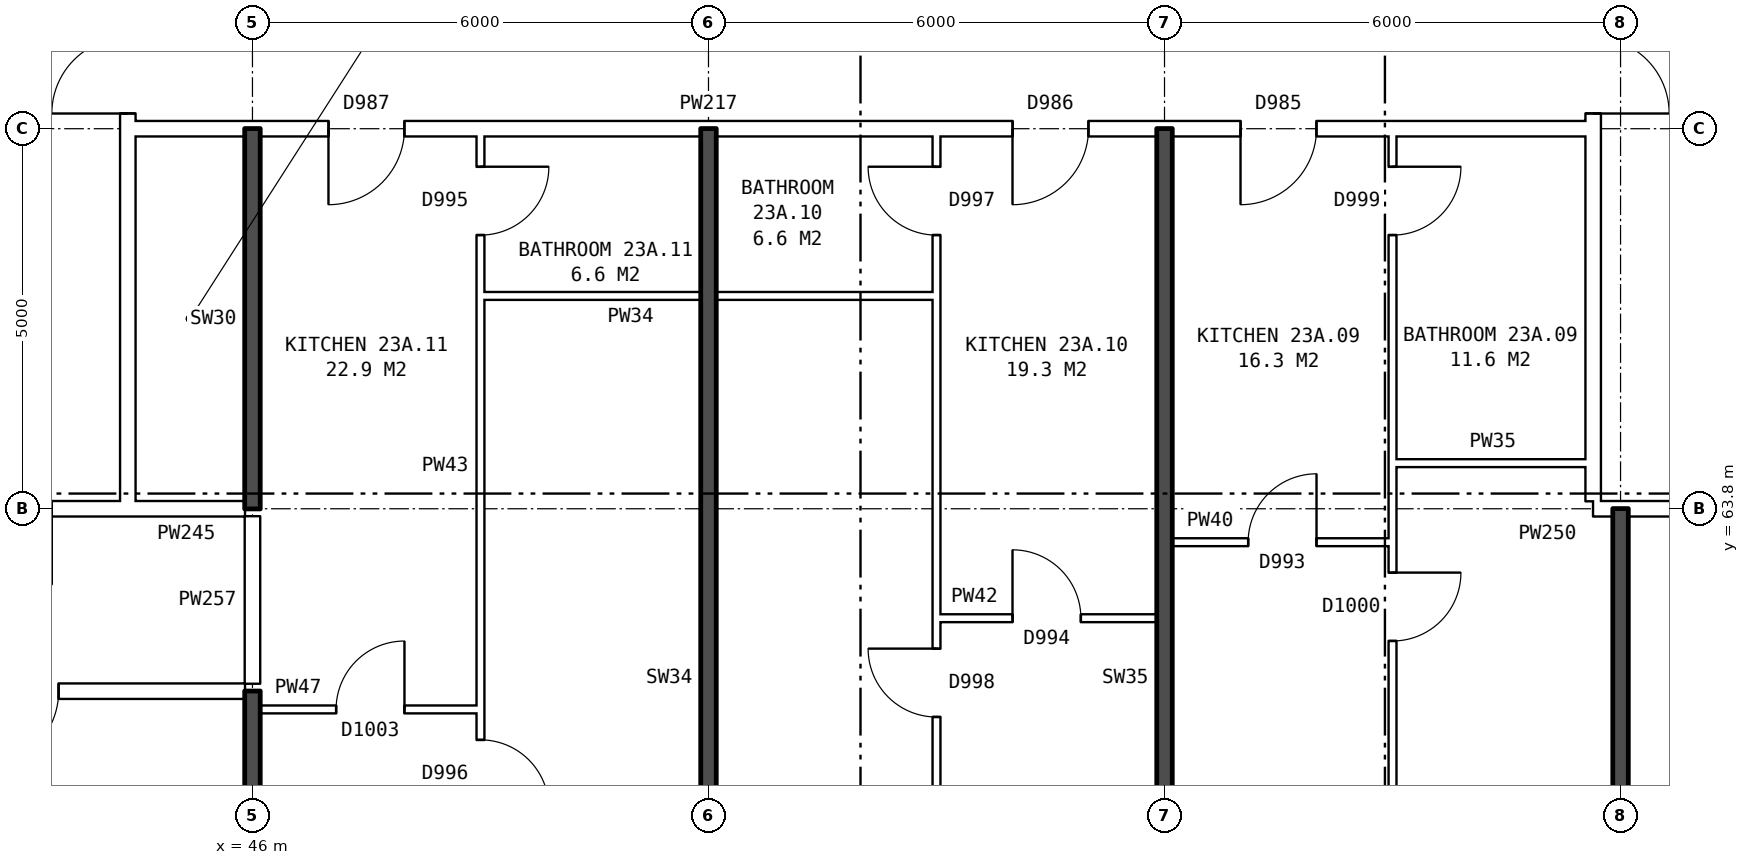
"""IFC4 building model, lengths in metres.
Left out: names, types, materials, properties, quantities, classifications, styles, units other than length and angle.
Written with IfcOpenShell. Run it as: python <this file> out.ifc"""

import sys

from ifc_helpers import new_model, si_unit, direction, frame, frame_2d, origin, place, context, subcontext, project, spatial, rectangle, extrude, element, fill, save


model = new_model("IFC4")
c1 = context("Model", 3, precision=1e-05, world=origin(), true_north=direction((0.0, 1.0)))
c2 = subcontext(c1, "Body", "Model", "MODEL_VIEW")
j1 = project(units=[si_unit("LENGTHUNIT", "METRE"), si_unit("PLANEANGLEUNIT", "RADIAN")], contexts=[c1])
p1 = place(None, origin())
s1 = spatial("IfcSite", under=j1, at=p1, CompositionType="ELEMENT")
p2 = place(p1, origin())
s2 = spatial("IfcBuilding", under=s1, at=p2, CompositionType="ELEMENT")
p3 = place(p2, frame((0.0, 0.0, 84.0)))
s3 = spatial("IfcBuildingStorey", under=s2, at=p3, CompositionType="ELEMENT", Elevation=84.0)
p4 = place(p3, frame((63.64, 63.9, 0.0), z_axis=(0.0, 0.0, 1.0), x_axis=(0.0, 1.0, 0.0)))
e1 = element("IfcWall", 1, at=p4, inside=s3, PredefinedType="PARTITIONING", context=c2, shape_type="SweptSolid", body=[
    extrude(rectangle(XDim=12.2, YDim=0.2, at=frame_2d((6.1, 0.0))), origin(), (0.0, 0.0, 1.0), 2.85),
])
p5 = place(p4, frame((5.1, 0.0, 0.0)))
e2 = element("IfcOpeningElement", 2, at=p5, cuts=e1, PredefinedType="OPENING", context=c2, shape_type="SweptSolid", body=[
    extrude(rectangle(XDim=2.0, YDim=2.1, at=frame_2d((1.0, 1.05))), frame((0.0, 0.11, 0.0), z_axis=(0.0, -1.0, 0.0), x_axis=(1.0, 0.0, 0.0)), (0.0, 0.0, 1.0), 0.22),
])
p6 = place(p3, frame((44.36, 63.9, 0.0), z_axis=(0.0, 0.0, 1.0), x_axis=(0.0, 1.0, 0.0)))
e3 = element("IfcWall", 3, at=p6, inside=s3, PredefinedType="PARTITIONING", context=c2, shape_type="SweptSolid", body=[
    extrude(rectangle(XDim=12.2, YDim=0.2, at=frame_2d((6.1, 0.0))), origin(), (0.0, 0.0, 1.0), 2.85),
])
p7 = place(p6, frame((5.1, 0.0, 0.0)))
e4 = element("IfcOpeningElement", 4, at=p7, cuts=e3, PredefinedType="OPENING", context=c2, shape_type="SweptSolid", body=[
    extrude(rectangle(XDim=2.0, YDim=2.1, at=frame_2d((1.0, 1.05))), frame((0.0, 0.11, 0.0), z_axis=(0.0, -1.0, 0.0), x_axis=(1.0, 0.0, 0.0)), (0.0, 0.0, 1.0), 0.22),
])
p8 = place(p3, frame((46.1, 61.16, 0.0), z_axis=(0.0, 0.0, 1.0), x_axis=(1.0, 0.0, 0.0)))
e5 = element("IfcWall", 5, at=p8, inside=s3, PredefinedType="PARTITIONING", context=c2, shape_type="SweptSolid", body=[
    extrude(rectangle(XDim=2.9, YDim=0.1, at=frame_2d((1.45, 0.0))), origin(), (0.0, 0.0, 1.0), 2.85),
])
p9 = place(p8, frame((1.0, 0.0, 0.0)))
e6 = element("IfcOpeningElement", 6, at=p9, cuts=e5, PredefinedType="OPENING", context=c2, shape_type="SweptSolid", body=[
    extrude(rectangle(XDim=0.9, YDim=2.1, at=frame_2d((0.45, 1.05))), frame((0.0, 0.06, 0.0), z_axis=(0.0, -1.0, 0.0), x_axis=(1.0, 0.0, 0.0)), (0.0, 0.0, 1.0), 0.12),
])
p10 = place(p3, frame((23.61, 61.4, 0.0), z_axis=(0.0, 0.0, 1.0), x_axis=(1.0, 0.0, 0.0)))
e7 = element("IfcWall", 7, at=p10, inside=s3, PredefinedType="PARTITIONING", context=c2, shape_type="SweptSolid", body=[
    extrude(rectangle(XDim=22.29, YDim=0.2, at=frame_2d((11.145, 0.0))), origin(), (0.0, 0.0, 1.0), 2.85),
])
p11 = place(p10, frame((18.84, 0.0, 0.0)))
e8 = element("IfcOpeningElement", 8, at=p11, cuts=e7, PredefinedType="OPENING", context=c2, shape_type="SweptSolid", body=[
    extrude(rectangle(XDim=1.0, YDim=2.1, at=frame_2d((0.5, 1.05))), frame((0.0, 0.11, 0.0), z_axis=(0.0, -1.0, 0.0), x_axis=(1.0, 0.0, 0.0)), (0.0, 0.0, 1.0), 0.22),
])
p12 = place(p10, frame((6.89, 0.0, 0.0)))
e9 = element("IfcOpeningElement", 9, at=p12, cuts=e7, PredefinedType="OPENING", context=c2, shape_type="SweptSolid", body=[
    extrude(rectangle(XDim=1.0, YDim=2.1, at=frame_2d((0.5, 1.05))), frame((0.0, 0.11, 0.0), z_axis=(0.0, -1.0, 0.0), x_axis=(1.0, 0.0, 0.0)), (0.0, 0.0, 1.0), 0.22),
])
p13 = place(p3, frame((55.0, 62.36, 0.0), z_axis=(0.0, 0.0, 1.0), x_axis=(1.0, 0.0, 0.0)))
e10 = element("IfcWall", 10, at=p13, inside=s3, PredefinedType="PARTITIONING", context=c2, shape_type="SweptSolid", body=[
    extrude(rectangle(XDim=2.9, YDim=0.1, at=frame_2d((1.45, 0.0))), origin(), (0.0, 0.0, 1.0), 2.85),
])
p14 = place(p13, frame((1.0, 0.0, 0.0)))
e11 = element("IfcOpeningElement", 11, at=p14, cuts=e10, PredefinedType="OPENING", context=c2, shape_type="SweptSolid", body=[
    extrude(rectangle(XDim=0.9, YDim=2.1, at=frame_2d((0.45, 1.05))), frame((0.0, 0.06, 0.0), z_axis=(0.0, -1.0, 0.0), x_axis=(1.0, 0.0, 0.0)), (0.0, 0.0, 1.0), 0.12),
])
p15 = place(p3, frame((58.1, 63.36, 0.0), z_axis=(0.0, 0.0, 1.0), x_axis=(1.0, 0.0, 0.0)))
e12 = element("IfcWall", 12, at=p15, inside=s3, PredefinedType="PARTITIONING", context=c2, shape_type="SweptSolid", body=[
    extrude(rectangle(XDim=2.9, YDim=0.1, at=frame_2d((1.45, 0.0))), origin(), (0.0, 0.0, 1.0), 2.85),
])
p16 = place(p15, frame((1.0, 0.0, 0.0)))
e13 = element("IfcOpeningElement", 13, at=p16, cuts=e12, PredefinedType="OPENING", context=c2, shape_type="SweptSolid", body=[
    extrude(rectangle(XDim=0.9, YDim=2.1, at=frame_2d((0.45, 1.05))), frame((0.0, 0.06, 0.0), z_axis=(0.0, -1.0, 0.0), x_axis=(1.0, 0.0, 0.0)), (0.0, 0.0, 1.0), 0.12),
])
p17 = place(p3, frame((41.36, 63.8, 0.0), z_axis=(0.0, 0.0, 1.0), x_axis=(1.0, 0.0, 0.0)))
e14 = element("IfcWall", 14, at=p17, inside=s3, PredefinedType="PARTITIONING", context=c2, shape_type="SweptSolid", body=[
    extrude(rectangle(XDim=3.0, YDim=0.2, at=frame_2d((1.5, 0.0))), origin(), (0.0, 0.0, 1.0), 2.85),
])
p18 = place(p17, frame((1.0, 0.0, 0.0)))
e15 = element("IfcOpeningElement", 15, at=p18, cuts=e14, PredefinedType="OPENING", context=c2, shape_type="SweptSolid", body=[
    extrude(rectangle(XDim=1.0, YDim=2.1, at=frame_2d((0.5, 1.05))), frame((0.0, 0.11, 0.0), z_axis=(0.0, -1.0, 0.0), x_axis=(1.0, 0.0, 0.0)), (0.0, 0.0, 1.0), 0.22),
])
p19 = place(p3, frame((44.36, 63.8, 0.0), z_axis=(0.0, 0.0, 1.0), x_axis=(1.0, 0.0, 0.0)))
e16 = element("IfcWall", 16, at=p19, inside=s3, PredefinedType="PARTITIONING", context=c2, shape_type="SweptSolid", body=[
    extrude(rectangle(XDim=1.54, YDim=0.2, at=frame_2d((0.77, 0.0))), origin(), (0.0, 0.0, 1.0), 2.85),
])
p20 = place(p3, frame((63.64, 63.8, 0.0), z_axis=(0.0, 0.0, 1.0), x_axis=(1.0, 0.0, 0.0)))
e17 = element("IfcWall", 17, at=p20, inside=s3, PredefinedType="PARTITIONING", context=c2, shape_type="SweptSolid", body=[
    extrude(rectangle(XDim=3.0, YDim=0.2, at=frame_2d((1.5, 0.0))), origin(), (0.0, 0.0, 1.0), 2.85),
])
p21 = place(p20, frame((1.18, 0.0, 0.0)))
e18 = element("IfcOpeningElement", 18, at=p21, cuts=e17, PredefinedType="OPENING", context=c2, shape_type="SweptSolid", body=[
    extrude(rectangle(XDim=1.0, YDim=2.1, at=frame_2d((0.5, 1.05))), frame((0.0, 0.11, 0.0), z_axis=(0.0, -1.0, 0.0), x_axis=(1.0, 0.0, 0.0)), (0.0, 0.0, 1.0), 0.22),
])
p22 = place(p3, frame((61.0, 64.4, 0.0), z_axis=(0.0, 0.0, 1.0), x_axis=(1.0, 0.0, 0.0)))
e19 = element("IfcWall", 19, at=p22, inside=s3, PredefinedType="PARTITIONING", context=c2, shape_type="SweptSolid", body=[
    extrude(rectangle(XDim=2.64, YDim=0.1, at=frame_2d((1.32, 0.0))), origin(), (0.0, 0.0, 1.0), 2.85),
])
p23 = place(p3, frame((49.0, 66.6, 0.0), z_axis=(0.0, 0.0, 1.0), x_axis=(1.0, 0.0, 0.0)))
e20 = element("IfcWall", 20, at=p23, inside=s3, PredefinedType="PARTITIONING", context=c2, shape_type="SweptSolid", body=[
    extrude(rectangle(XDim=6.0, YDim=0.1, at=frame_2d((3.0, 0.0))), origin(), (0.0, 0.0, 1.0), 2.85),
])
p24 = place(p3, frame((44.36, 68.8, 0.0), z_axis=(0.0, 0.0, 1.0), x_axis=(1.0, 0.0, 0.0)))
e21 = element("IfcWall", 21, at=p24, inside=s3, PredefinedType="PARTITIONING", context=c2, shape_type="SweptSolid", body=[
    extrude(rectangle(XDim=19.28, YDim=0.2, at=frame_2d((9.64, 0.0))), origin(), (0.0, 0.0, 1.0), 2.85),
])
p25 = place(p24, frame((14.64, 0.0, 0.0)))
e22 = element("IfcOpeningElement", 22, at=p25, cuts=e21, PredefinedType="OPENING", context=c2, shape_type="SweptSolid", body=[
    extrude(rectangle(XDim=1.0, YDim=2.1, at=frame_2d((0.5, 1.05))), frame((0.0, 0.11, 0.0), z_axis=(0.0, -1.0, 0.0), x_axis=(1.0, 0.0, 0.0)), (0.0, 0.0, 1.0), 0.22),
])
p26 = place(p24, frame((11.64, 0.0, 0.0)))
e23 = element("IfcOpeningElement", 23, at=p26, cuts=e21, PredefinedType="OPENING", context=c2, shape_type="SweptSolid", body=[
    extrude(rectangle(XDim=1.0, YDim=2.1, at=frame_2d((0.5, 1.05))), frame((0.0, 0.11, 0.0), z_axis=(0.0, -1.0, 0.0), x_axis=(1.0, 0.0, 0.0)), (0.0, 0.0, 1.0), 0.22),
])
p27 = place(p24, frame((2.64, 0.0, 0.0)))
e24 = element("IfcOpeningElement", 24, at=p27, cuts=e21, PredefinedType="OPENING", context=c2, shape_type="SweptSolid", body=[
    extrude(rectangle(XDim=1.0, YDim=2.1, at=frame_2d((0.5, 1.05))), frame((0.0, 0.11, 0.0), z_axis=(0.0, -1.0, 0.0), x_axis=(1.0, 0.0, 0.0)), (0.0, 0.0, 1.0), 0.22),
])
p28 = place(p3, frame((46.0, 54.36, 0.0), z_axis=(0.0, 0.0, 1.0), x_axis=(0.0, 1.0, 0.0)))
e25 = element("IfcWall", 25, at=p28, inside=s3, PredefinedType="SOLIDWALL", context=c2, shape_type="SweptSolid", body=[
    extrude(rectangle(XDim=7.04, YDim=0.2, at=frame_2d((3.52, 0.0))), origin(), (0.0, 0.0, 1.0), 2.85),
])
p29 = place(p3, frame((46.0, 61.5, 0.0), z_axis=(0.0, 0.0, 1.0), x_axis=(0.0, 1.0, 0.0)))
e26 = element("IfcWall", 26, at=p29, inside=s3, PredefinedType="PARTITIONING", context=c2, shape_type="SweptSolid", body=[
    extrude(rectangle(XDim=2.2, YDim=0.2, at=frame_2d((1.1, 0.0))), origin(), (0.0, 0.0, 1.0), 2.85),
])
p30 = place(p3, frame((46.0, 63.8, 0.0), z_axis=(0.0, 0.0, 1.0), x_axis=(0.0, 1.0, 0.0)))
e27 = element("IfcWall", 27, at=p30, inside=s3, PredefinedType="SOLIDWALL", context=c2, shape_type="SweptSolid", body=[
    extrude(rectangle(XDim=5.0, YDim=0.2, at=frame_2d((2.5, 0.0))), origin(), (0.0, 0.0, 1.0), 2.85),
])
p31 = place(p3, frame((49.0, 54.36, 0.0), z_axis=(0.0, 0.0, 1.0), x_axis=(0.0, 1.0, 0.0)))
e28 = element("IfcWall", 28, at=p31, inside=s3, PredefinedType="PARTITIONING", context=c2, shape_type="SweptSolid", body=[
    extrude(rectangle(XDim=14.34, YDim=0.1, at=frame_2d((7.17, 0.0))), origin(), (0.0, 0.0, 1.0), 2.85),
])
p32 = place(p31, frame((5.5, 0.0, 0.0)))
e29 = element("IfcOpeningElement", 29, at=p32, cuts=e28, PredefinedType="OPENING", context=c2, shape_type="SweptSolid", body=[
    extrude(rectangle(XDim=0.9, YDim=2.1, at=frame_2d((0.45, 1.05))), frame((0.0, 0.06, 0.0), z_axis=(0.0, -1.0, 0.0), x_axis=(1.0, 0.0, 0.0)), (0.0, 0.0, 1.0), 0.12),
])
p33 = place(p31, frame((13.04, 0.0, 0.0)))
e30 = element("IfcOpeningElement", 30, at=p33, cuts=e28, PredefinedType="OPENING", context=c2, shape_type="SweptSolid", body=[
    extrude(rectangle(XDim=0.9, YDim=2.1, at=frame_2d((0.45, 1.05))), frame((0.0, 0.06, 0.0), z_axis=(0.0, -1.0, 0.0), x_axis=(1.0, 0.0, 0.0)), (0.0, 0.0, 1.0), 0.12),
])
p34 = place(p3, frame((52.0, 54.36, 0.0), z_axis=(0.0, 0.0, 1.0), x_axis=(0.0, 1.0, 0.0)))
e31 = element("IfcWall", 31, at=p34, inside=s3, PredefinedType="SOLIDWALL", context=c2, shape_type="SweptSolid", body=[
    extrude(rectangle(XDim=14.44, YDim=0.2, at=frame_2d((7.22, 0.0))), origin(), (0.0, 0.0, 1.0), 2.85),
])
p35 = place(p3, frame((55.0, 54.36, 0.0), z_axis=(0.0, 0.0, 1.0), x_axis=(0.0, 1.0, 0.0)))
e32 = element("IfcWall", 32, at=p35, inside=s3, PredefinedType="PARTITIONING", context=c2, shape_type="SweptSolid", body=[
    extrude(rectangle(XDim=14.34, YDim=0.1, at=frame_2d((7.17, 0.0))), origin(), (0.0, 0.0, 1.0), 2.85),
])
p36 = place(p35, frame((6.7, 0.0, 0.0)))
e33 = element("IfcOpeningElement", 33, at=p36, cuts=e32, PredefinedType="OPENING", context=c2, shape_type="SweptSolid", body=[
    extrude(rectangle(XDim=0.9, YDim=2.1, at=frame_2d((0.45, 1.05))), frame((0.0, 0.06, 0.0), z_axis=(0.0, -1.0, 0.0), x_axis=(1.0, 0.0, 0.0)), (0.0, 0.0, 1.0), 0.12),
])
p37 = place(p35, frame((13.04, 0.0, 0.0)))
e34 = element("IfcOpeningElement", 34, at=p37, cuts=e32, PredefinedType="OPENING", context=c2, shape_type="SweptSolid", body=[
    extrude(rectangle(XDim=0.9, YDim=2.1, at=frame_2d((0.45, 1.05))), frame((0.0, 0.06, 0.0), z_axis=(0.0, -1.0, 0.0), x_axis=(1.0, 0.0, 0.0)), (0.0, 0.0, 1.0), 0.12),
])
p38 = place(p3, frame((58.0, 54.36, 0.0), z_axis=(0.0, 0.0, 1.0), x_axis=(0.0, 1.0, 0.0)))
e35 = element("IfcWall", 35, at=p38, inside=s3, PredefinedType="SOLIDWALL", context=c2, shape_type="SweptSolid", body=[
    extrude(rectangle(XDim=14.44, YDim=0.2, at=frame_2d((7.22, 0.0))), origin(), (0.0, 0.0, 1.0), 2.85),
])
p39 = place(p3, frame((61.0, 54.36, 0.0), z_axis=(0.0, 0.0, 1.0), x_axis=(0.0, 1.0, 0.0)))
e36 = element("IfcWall", 36, at=p39, inside=s3, PredefinedType="PARTITIONING", context=c2, shape_type="SweptSolid", body=[
    extrude(rectangle(XDim=14.34, YDim=0.1, at=frame_2d((7.17, 0.0))), origin(), (0.0, 0.0, 1.0), 2.85),
])
p40 = place(p39, frame((7.7, 0.0, 0.0)))
e37 = element("IfcOpeningElement", 37, at=p40, cuts=e36, PredefinedType="OPENING", context=c2, shape_type="SweptSolid", body=[
    extrude(rectangle(XDim=0.9, YDim=2.1, at=frame_2d((0.45, 1.05))), frame((0.0, 0.06, 0.0), z_axis=(0.0, -1.0, 0.0), x_axis=(1.0, 0.0, 0.0)), (0.0, 0.0, 1.0), 0.12),
])
p41 = place(p39, frame((13.04, 0.0, 0.0)))
e38 = element("IfcOpeningElement", 38, at=p41, cuts=e36, PredefinedType="OPENING", context=c2, shape_type="SweptSolid", body=[
    extrude(rectangle(XDim=0.9, YDim=2.1, at=frame_2d((0.45, 1.05))), frame((0.0, 0.06, 0.0), z_axis=(0.0, -1.0, 0.0), x_axis=(1.0, 0.0, 0.0)), (0.0, 0.0, 1.0), 0.12),
])
p42 = place(p3, frame((64.0, 54.36, 0.0), z_axis=(0.0, 0.0, 1.0), x_axis=(0.0, 1.0, 0.0)))
e39 = element("IfcWall", 39, at=p42, inside=s3, PredefinedType="SOLIDWALL", context=c2, shape_type="SweptSolid", body=[
    extrude(rectangle(XDim=9.44, YDim=0.2, at=frame_2d((4.72, 0.0))), origin(), (0.0, 0.0, 1.0), 2.85),
])
p43 = place(p5, frame((2.0, 0.0, 0.0), z_axis=(0.0, 0.0, 1.0), x_axis=(-1.0, 0.0, 0.0)))
e40 = element("IfcDoor", 40, at=p43, inside=s3, OperationType="DOUBLE_DOOR_SINGLE_SWING", PredefinedType="DOOR", context=c2, shape_type="SweptSolid", body=[
    extrude(rectangle(XDim=2.0, YDim=2.1, at=frame_2d((1.0, 1.05))), frame((0.0, 0.025, 0.0), z_axis=(0.0, -1.0, 0.0), x_axis=(1.0, 0.0, 0.0)), (0.0, 0.0, 1.0), 0.05),
])
fill(e2, e40)
p44 = place(p7, origin())
e41 = element("IfcDoor", 41, at=p44, inside=s3, OperationType="DOUBLE_DOOR_SINGLE_SWING", PredefinedType="DOOR", context=c2, shape_type="SweptSolid", body=[
    extrude(rectangle(XDim=2.0, YDim=2.1, at=frame_2d((1.0, 1.05))), frame((0.0, 0.025, 0.0), z_axis=(0.0, -1.0, 0.0), x_axis=(1.0, 0.0, 0.0)), (0.0, 0.0, 1.0), 0.05),
])
fill(e4, e41)
p45 = place(p40, frame((0.9, 0.0, 0.0), z_axis=(0.0, 0.0, 1.0), x_axis=(-1.0, 0.0, 0.0)))
e42 = element("IfcDoor", 42, at=p45, inside=s3, OperationType="SINGLE_SWING_LEFT", PredefinedType="DOOR", context=c2, shape_type="SweptSolid", body=[
    extrude(rectangle(XDim=0.9, YDim=2.1, at=frame_2d((0.45, 1.05))), frame((0.0, 0.025, 0.0), z_axis=(0.0, -1.0, 0.0), x_axis=(1.0, 0.0, 0.0)), (0.0, 0.0, 1.0), 0.05),
])
fill(e37, e42)
p46 = place(p25, frame((1.0, 0.0, 0.0), z_axis=(0.0, 0.0, 1.0), x_axis=(-1.0, 0.0, 0.0)))
e43 = element("IfcDoor", 43, at=p46, inside=s3, OperationType="SINGLE_SWING_RIGHT", PredefinedType="DOOR", context=c2, shape_type="SweptSolid", body=[
    extrude(rectangle(XDim=1.0, YDim=2.1, at=frame_2d((0.5, 1.05))), frame((0.0, 0.025, 0.0), z_axis=(0.0, -1.0, 0.0), x_axis=(1.0, 0.0, 0.0)), (0.0, 0.0, 1.0), 0.05),
])
fill(e22, e43)
p47 = place(p16, origin())
e44 = element("IfcDoor", 44, at=p47, inside=s3, OperationType="SINGLE_SWING_RIGHT", PredefinedType="DOOR", context=c2, shape_type="SweptSolid", body=[
    extrude(rectangle(XDim=0.9, YDim=2.1, at=frame_2d((0.45, 1.05))), frame((0.0, 0.025, 0.0), z_axis=(0.0, -1.0, 0.0), x_axis=(1.0, 0.0, 0.0)), (0.0, 0.0, 1.0), 0.05),
])
fill(e13, e44)
p48 = place(p41, frame((0.9, 0.0, 0.0), z_axis=(0.0, 0.0, 1.0), x_axis=(-1.0, 0.0, 0.0)))
e45 = element("IfcDoor", 45, at=p48, inside=s3, OperationType="SINGLE_SWING_LEFT", PredefinedType="DOOR", context=c2, shape_type="SweptSolid", body=[
    extrude(rectangle(XDim=0.9, YDim=2.1, at=frame_2d((0.45, 1.05))), frame((0.0, 0.025, 0.0), z_axis=(0.0, -1.0, 0.0), x_axis=(1.0, 0.0, 0.0)), (0.0, 0.0, 1.0), 0.05),
])
fill(e38, e45)
p49 = place(p36, origin())
e46 = element("IfcDoor", 46, at=p49, inside=s3, OperationType="SINGLE_SWING_RIGHT", PredefinedType="DOOR", context=c2, shape_type="SweptSolid", body=[
    extrude(rectangle(XDim=0.9, YDim=2.1, at=frame_2d((0.45, 1.05))), frame((0.0, 0.025, 0.0), z_axis=(0.0, -1.0, 0.0), x_axis=(1.0, 0.0, 0.0)), (0.0, 0.0, 1.0), 0.05),
])
fill(e33, e46)
p50 = place(p26, frame((1.0, 0.0, 0.0), z_axis=(0.0, 0.0, 1.0), x_axis=(-1.0, 0.0, 0.0)))
e47 = element("IfcDoor", 47, at=p50, inside=s3, OperationType="SINGLE_SWING_RIGHT", PredefinedType="DOOR", context=c2, shape_type="SweptSolid", body=[
    extrude(rectangle(XDim=1.0, YDim=2.1, at=frame_2d((0.5, 1.05))), frame((0.0, 0.025, 0.0), z_axis=(0.0, -1.0, 0.0), x_axis=(1.0, 0.0, 0.0)), (0.0, 0.0, 1.0), 0.05),
])
fill(e23, e47)
p51 = place(p14, origin())
e48 = element("IfcDoor", 48, at=p51, inside=s3, OperationType="SINGLE_SWING_LEFT", PredefinedType="DOOR", context=c2, shape_type="SweptSolid", body=[
    extrude(rectangle(XDim=0.9, YDim=2.1, at=frame_2d((0.45, 1.05))), frame((0.0, 0.025, 0.0), z_axis=(0.0, -1.0, 0.0), x_axis=(1.0, 0.0, 0.0)), (0.0, 0.0, 1.0), 0.05),
])
fill(e11, e48)
p52 = place(p37, origin())
e49 = element("IfcDoor", 49, at=p52, inside=s3, OperationType="SINGLE_SWING_RIGHT", PredefinedType="DOOR", context=c2, shape_type="SweptSolid", body=[
    extrude(rectangle(XDim=0.9, YDim=2.1, at=frame_2d((0.45, 1.05))), frame((0.0, 0.025, 0.0), z_axis=(0.0, -1.0, 0.0), x_axis=(1.0, 0.0, 0.0)), (0.0, 0.0, 1.0), 0.05),
])
fill(e34, e49)
p53 = place(p32, frame((0.9, 0.0, 0.0), z_axis=(0.0, 0.0, 1.0), x_axis=(-1.0, 0.0, 0.0)))
e50 = element("IfcDoor", 50, at=p53, inside=s3, OperationType="SINGLE_SWING_RIGHT", PredefinedType="DOOR", context=c2, shape_type="SweptSolid", body=[
    extrude(rectangle(XDim=0.9, YDim=2.1, at=frame_2d((0.45, 1.05))), frame((0.0, 0.025, 0.0), z_axis=(0.0, -1.0, 0.0), x_axis=(1.0, 0.0, 0.0)), (0.0, 0.0, 1.0), 0.05),
])
fill(e29, e50)
p54 = place(p27, frame((1.0, 0.0, 0.0), z_axis=(0.0, 0.0, 1.0), x_axis=(-1.0, 0.0, 0.0)))
e51 = element("IfcDoor", 51, at=p54, inside=s3, OperationType="SINGLE_SWING_RIGHT", PredefinedType="DOOR", context=c2, shape_type="SweptSolid", body=[
    extrude(rectangle(XDim=1.0, YDim=2.1, at=frame_2d((0.5, 1.05))), frame((0.0, 0.025, 0.0), z_axis=(0.0, -1.0, 0.0), x_axis=(1.0, 0.0, 0.0)), (0.0, 0.0, 1.0), 0.05),
])
fill(e24, e51)
p55 = place(p9, origin())
e52 = element("IfcDoor", 52, at=p55, inside=s3, OperationType="SINGLE_SWING_RIGHT", PredefinedType="DOOR", context=c2, shape_type="SweptSolid", body=[
    extrude(rectangle(XDim=0.9, YDim=2.1, at=frame_2d((0.45, 1.05))), frame((0.0, 0.025, 0.0), z_axis=(0.0, -1.0, 0.0), x_axis=(1.0, 0.0, 0.0)), (0.0, 0.0, 1.0), 0.05),
])
fill(e6, e52)
p56 = place(p33, frame((0.9, 0.0, 0.0), z_axis=(0.0, 0.0, 1.0), x_axis=(-1.0, 0.0, 0.0)))
e53 = element("IfcDoor", 53, at=p56, inside=s3, OperationType="SINGLE_SWING_LEFT", PredefinedType="DOOR", context=c2, shape_type="SweptSolid", body=[
    extrude(rectangle(XDim=0.9, YDim=2.1, at=frame_2d((0.45, 1.05))), frame((0.0, 0.025, 0.0), z_axis=(0.0, -1.0, 0.0), x_axis=(1.0, 0.0, 0.0)), (0.0, 0.0, 1.0), 0.05),
])
fill(e30, e53)
p57 = place(p11, frame((1.0, 0.0, 0.0), z_axis=(0.0, 0.0, 1.0), x_axis=(-1.0, 0.0, 0.0)))
e54 = element("IfcDoor", 54, at=p57, inside=s3, OperationType="SINGLE_SWING_RIGHT", PredefinedType="DOOR", context=c2, shape_type="SweptSolid", body=[
    extrude(rectangle(XDim=1.0, YDim=2.1, at=frame_2d((0.5, 1.05))), frame((0.0, 0.025, 0.0), z_axis=(0.0, -1.0, 0.0), x_axis=(1.0, 0.0, 0.0)), (0.0, 0.0, 1.0), 0.05),
])
fill(e8, e54)
save(model, sys.argv[1])
